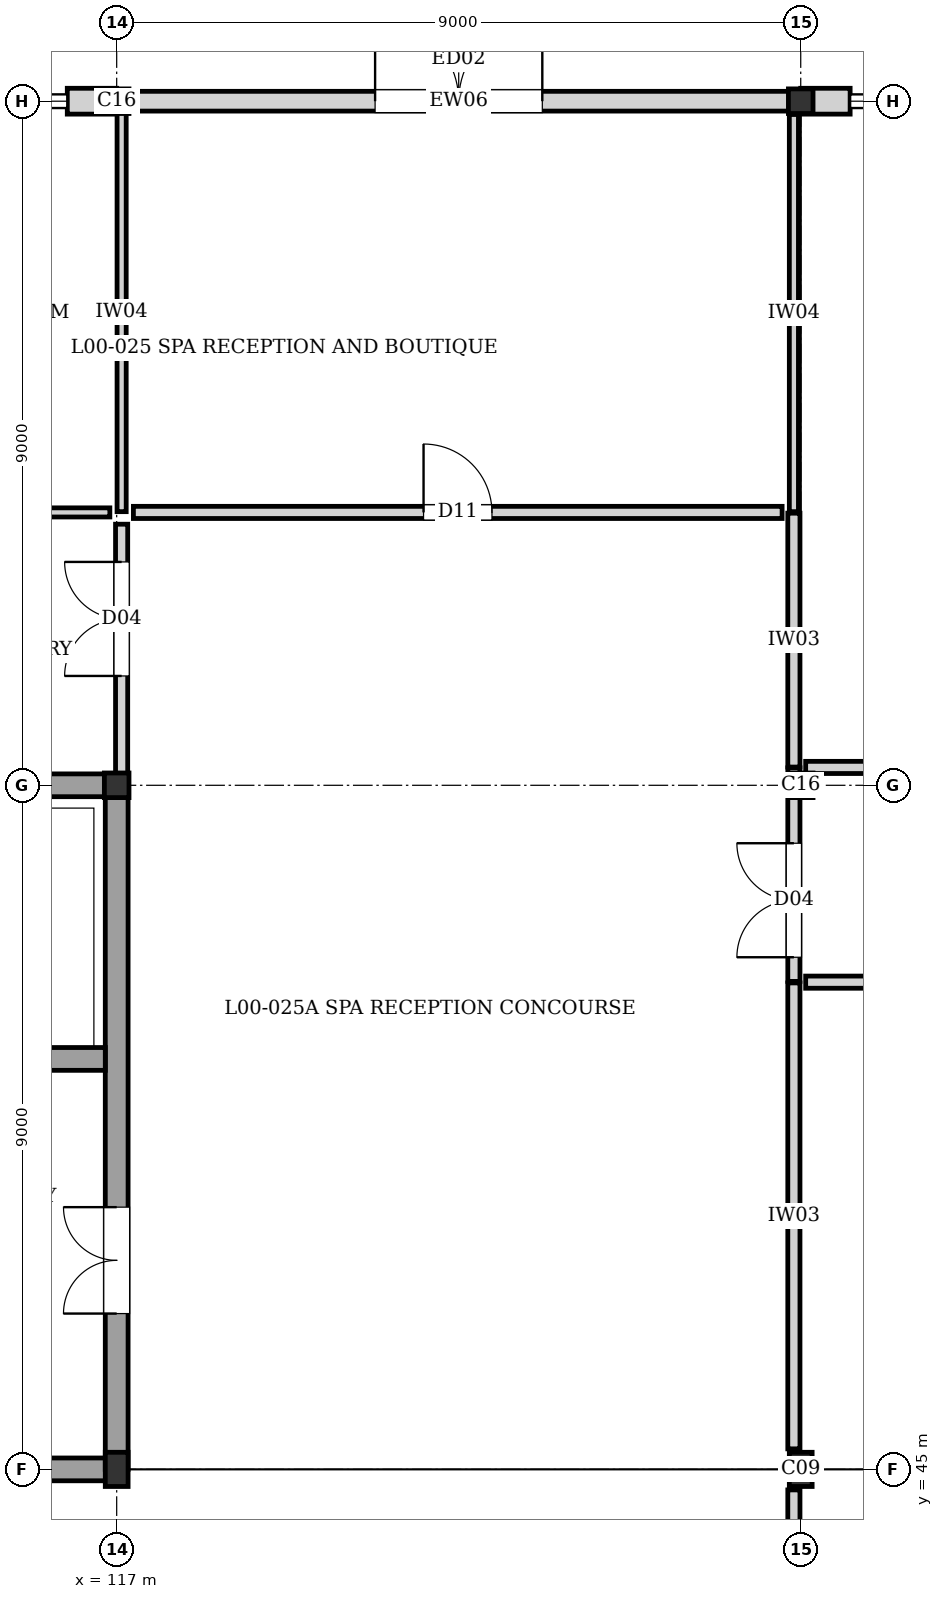
"""IFC4 building model, lengths in metres.
Left out: names, types, materials, properties, quantities, classifications, styles, units other than length and angle.
Written with IfcOpenShell. Run it as: python <this file> out.ifc"""

import sys

from ifc_helpers import new_model, si_unit, direction, frame, frame_2d, origin, origin_2d, place, context, subcontext, project, spatial, rectangle, hollow_circle, i_section, extrude, element, fill, save


model = new_model("IFC4")
c1 = context("Model", 3, precision=1e-05, world=origin(), true_north=direction((0.0, 1.0)))
c2 = subcontext(c1, "Body", "Model", "MODEL_VIEW")
j1 = project(units=[si_unit("LENGTHUNIT", "METRE"), si_unit("PLANEANGLEUNIT", "RADIAN")], contexts=[c1])
p1 = place(None, origin())
s1 = spatial("IfcSite", under=j1, at=p1, CompositionType="ELEMENT")
p2 = place(p1, origin())
s2 = spatial("IfcBuilding", under=s1, at=p2, CompositionType="ELEMENT")
p3 = place(p2, origin())
s3 = spatial("IfcBuildingStorey", under=s2, at=p3, CompositionType="ELEMENT", Elevation=0.0)
p4 = place(p3, frame((117.0, 45.0, 0.0), z_axis=(0.0, 0.0, 1.0), x_axis=(1.0, 0.0, 0.0)))
e1 = element("IfcColumn", 1, at=p4, inside=s3, PredefinedType="COLUMN", context=c2, shape_type="SweptSolid", body=[
    extrude(i_section(OverallWidth=0.3, OverallDepth=0.45, WebThickness=0.014, FlangeThickness=0.026, at=origin_2d()), origin(), (0.0, 0.0, 1.0), 4.32),
])
for number, where, z_axis, x_axis in (
    (2, (117.0, 54.0, 0.0), (0.0, 0.0, 1.0), (1.0, 0.0, 0.0)),
    (3, (117.0, 63.0, 0.0), (0.0, 0.0, 1.0), (1.0, 0.0, 0.0)),
):
    element("IfcColumn", number, at=place(p3, frame(where, z_axis=z_axis, x_axis=x_axis)), inside=s3, PredefinedType="COLUMN", context=c2, shape_type="SweptSolid", body=[
        extrude(hollow_circle(Radius=0.162, WallThickness=0.016, at=origin_2d()), origin(), (0.0, 0.0, 1.0), 4.32),
    ])
p5 = place(p3, frame((126.0, 45.0, 0.0), z_axis=(0.0, 0.0, 1.0), x_axis=(1.0, 0.0, 0.0)))
e4 = element("IfcColumn", 4, at=p5, inside=s3, PredefinedType="COLUMN", context=c2, shape_type="SweptSolid", body=[
    extrude(i_section(OverallWidth=0.3, OverallDepth=0.45, WebThickness=0.014, FlangeThickness=0.026, at=origin_2d()), origin(), (0.0, 0.0, 1.0), 4.32),
])
for number, where, z_axis, x_axis in (
    (5, (126.0, 54.0, 0.0), (0.0, 0.0, 1.0), (1.0, 0.0, 0.0)),
    (6, (126.0, 63.0, 0.0), (0.0, 0.0, 1.0), (1.0, 0.0, 0.0)),
):
    element("IfcColumn", number, at=place(p3, frame(where, z_axis=z_axis, x_axis=x_axis)), inside=s3, PredefinedType="COLUMN", context=c2, shape_type="SweptSolid", body=[
        extrude(hollow_circle(Radius=0.162, WallThickness=0.016, at=origin_2d()), origin(), (0.0, 0.0, 1.0), 4.32),
    ])
p6 = place(p3, frame((116.35, 63.0, 0.0), z_axis=(0.0, 0.0, 1.0), x_axis=(1.0, 0.0, 0.0)))
e7 = element("IfcWall", 7, at=p6, inside=s3, PredefinedType="SOLIDWALL", context=c2, shape_type="SweptSolid", body=[
    extrude(rectangle(XDim=0.65, YDim=0.34, at=frame_2d((0.325, 0.0))), origin(), (0.0, 0.0, 1.0), 3.695),
])
p7 = place(p3, frame((117.0, 63.0, 0.0), z_axis=(0.0, 0.0, 1.0), x_axis=(1.0, 0.0, 0.0)))
e8 = element("IfcWall", 8, at=p7, inside=s3, PredefinedType="SOLIDWALL", context=c2, shape_type="SweptSolid", body=[
    extrude(rectangle(XDim=9.0, YDim=0.26, at=frame_2d((4.5, 0.0))), origin(), (0.0, 0.0, 1.0), 3.655),
])
p8 = place(p7, frame((3.4, 0.0, 0.0)))
e9 = element("IfcOpeningElement", 9, at=p8, cuts=e8, PredefinedType="OPENING", context=c2, shape_type="SweptSolid", body=[
    extrude(rectangle(XDim=2.2, YDim=2.5, at=frame_2d((1.1, 1.25))), frame((0.0, 0.14, 0.0), z_axis=(0.0, -1.0, 0.0), x_axis=(1.0, 0.0, 0.0)), (0.0, 0.0, 1.0), 0.28),
])
p9 = place(p3, frame((126.0, 63.0, 0.0), z_axis=(0.0, 0.0, 1.0), x_axis=(1.0, 0.0, 0.0)))
e10 = element("IfcWall", 10, at=p9, inside=s3, PredefinedType="SOLIDWALL", context=c2, shape_type="SweptSolid", body=[
    extrude(rectangle(XDim=0.65, YDim=0.34, at=frame_2d((0.325, 0.0))), origin(), (0.0, 0.0, 1.0), 3.825),
])
p10 = place(p3, frame((117.0, 45.0, 0.0), z_axis=(0.0, 0.0, 1.0), x_axis=(-1.0, 0.0, 0.0)))
e11 = element("IfcWall", 11, at=p10, inside=s3, PredefinedType="SHEAR", context=c2, shape_type="SweptSolid", body=[
    extrude(rectangle(XDim=9.0, YDim=0.3, at=frame_2d((4.5, 0.0))), origin(), (0.0, 0.0, 1.0), 4.055),
])
p11 = place(p10, frame((5.7, 0.0, 0.0)))
e12 = element("IfcOpeningElement", 12, at=p11, cuts=e11, PredefinedType="OPENING", context=c2, shape_type="SweptSolid", body=[
    extrude(rectangle(XDim=1.8, YDim=2.2, at=frame_2d((0.9, 1.1))), frame((0.0, 0.16, 0.0), z_axis=(0.0, -1.0, 0.0), x_axis=(1.0, 0.0, 0.0)), (0.0, 0.0, 1.0), 0.32),
])
p12 = place(p3, frame((117.0, 45.0, 0.0), z_axis=(0.0, 0.0, 1.0), x_axis=(0.0, 1.0, 0.0)))
e13 = element("IfcWall", 13, at=p12, inside=s3, PredefinedType="SHEAR", context=c2, shape_type="SweptSolid", body=[
    extrude(rectangle(XDim=9.0, YDim=0.3, at=frame_2d((4.5, 0.0))), origin(), (0.0, 0.0, 1.0), 4.055),
])
p13 = place(p12, frame((2.05, 0.0, 0.0)))
e14 = element("IfcOpeningElement", 14, at=p13, cuts=e13, PredefinedType="OPENING", context=c2, shape_type="SweptSolid", body=[
    extrude(rectangle(XDim=1.4, YDim=2.02, at=frame_2d((0.7, 1.01))), frame((0.0, 0.16, 0.0), z_axis=(0.0, -1.0, 0.0), x_axis=(1.0, 0.0, 0.0)), (0.0, 0.0, 1.0), 0.32),
])
p14 = place(p3, frame((108.0, 54.0, 0.0), z_axis=(0.0, 0.0, 1.0), x_axis=(1.0, 0.0, 0.0)))
e15 = element("IfcWall", 15, at=p14, inside=s3, PredefinedType="SHEAR", context=c2, shape_type="SweptSolid", body=[
    extrude(rectangle(XDim=9.0, YDim=0.3, at=frame_2d((4.5, 0.0))), origin(), (0.0, 0.0, 1.0), 4.055),
])
p15 = place(p3, frame((112.65, 50.4, 0.0), z_axis=(0.0, 0.0, 1.0), x_axis=(1.0, 0.0, 0.0)))
e16 = element("IfcWall", 16, at=p15, inside=s3, PredefinedType="SHEAR", context=c2, shape_type="SweptSolid", body=[
    extrude(rectangle(XDim=4.2, YDim=0.3, at=frame_2d((2.1, 0.0))), origin(), (0.0, 0.0, 1.0), 4.055),
])
p16 = place(p15, frame((1.5, 0.0, 0.0)))
e17 = element("IfcOpeningElement", 17, at=p16, cuts=e16, PredefinedType="OPENING", context=c2, shape_type="SweptSolid", body=[
    extrude(rectangle(XDim=1.2, YDim=2.2, at=frame_2d((0.6, 1.1))), frame((0.0, 0.16, 0.0), z_axis=(0.0, -1.0, 0.0), x_axis=(1.0, 0.0, 0.0)), (0.0, 0.0, 1.0), 0.32),
])
p17 = place(p3, frame((125.91, 45.27, 0.0), z_axis=(0.0, 0.0, 1.0), x_axis=(0.0, 1.0, 0.0)))
e18 = element("IfcWall", 18, at=p17, inside=s3, PredefinedType="PARTITIONING", context=c2, shape_type="SweptSolid", body=[
    extrude(rectangle(XDim=6.13, YDim=0.16, at=frame_2d((3.065, 0.0))), origin(), (0.0, 0.0, 1.0), 3.765),
])
p18 = place(p3, frame((125.91, 54.24, 0.0), z_axis=(0.0, 0.0, 1.0), x_axis=(0.0, 1.0, 0.0)))
e19 = element("IfcWall", 19, at=p18, inside=s3, PredefinedType="PARTITIONING", context=c2, shape_type="SweptSolid", body=[
    extrude(rectangle(XDim=3.34, YDim=0.16, at=frame_2d((1.67, 0.0))), origin(), (0.0, 0.0, 1.0), 3.725),
])
p19 = place(p3, frame((117.065, 57.6, 0.0), z_axis=(0.0, 0.0, 1.0), x_axis=(0.0, 1.0, 0.0)))
e20 = element("IfcWall", 20, at=p19, inside=s3, PredefinedType="PARTITIONING", context=c2, shape_type="SweptSolid", body=[
    extrude(rectangle(XDim=5.265, YDim=0.12, at=frame_2d((2.632, 0.0))), origin(), (0.0, 0.0, 1.0), 3.765),
])
p20 = place(p3, frame((125.91, 57.6, 0.0), z_axis=(0.0, 0.0, 1.0), x_axis=(0.0, 1.0, 0.0)))
e21 = element("IfcWall", 21, at=p20, inside=s3, PredefinedType="PARTITIONING", context=c2, shape_type="SweptSolid", body=[
    extrude(rectangle(XDim=5.225, YDim=0.12, at=frame_2d((2.612, 0.0))), origin(), (0.0, 0.0, 1.0), 3.725),
])
p21 = place(p3, frame((125.91, 36.145, 0.0), z_axis=(0.0, 0.0, 1.0), x_axis=(0.0, 1.0, 0.0)))
e22 = element("IfcWall", 22, at=p21, inside=s3, PredefinedType="PARTITIONING", context=c2, shape_type="SweptSolid", body=[
    extrude(rectangle(XDim=8.585, YDim=0.16, at=frame_2d((4.292, 0.0))), origin(), (0.0, 0.0, 1.0), 3.365),
])
p22 = place(p3, frame((117.22, 57.59, 0.0), z_axis=(0.0, 0.0, 1.0), x_axis=(1.0, 0.0, 0.0)))
e23 = element("IfcWall", 23, at=p22, inside=s3, PredefinedType="PARTITIONING", context=c2, shape_type="SweptSolid", body=[
    extrude(rectangle(XDim=8.535, YDim=0.16, at=frame_2d((4.268, 0.0))), origin(), (0.0, 0.0, 1.0), 4.055),
])
p23 = place(p22, frame((3.817, 0.0, 0.0)))
e24 = element("IfcOpeningElement", 24, at=p23, cuts=e23, PredefinedType="OPENING", context=c2, shape_type="SweptSolid", body=[
    extrude(rectangle(XDim=0.9, YDim=2.2, at=frame_2d((0.45, 1.1))), frame((0.0, 0.09, 0.0), z_axis=(0.0, -1.0, 0.0), x_axis=(1.0, 0.0, 0.0)), (0.0, 0.0, 1.0), 0.18),
])
p24 = place(p3, frame((117.065, 54.155, 0.0), z_axis=(0.0, 0.0, 1.0), x_axis=(0.0, 1.0, 0.0)))
e25 = element("IfcWall", 25, at=p24, inside=s3, PredefinedType="PARTITIONING", context=c2, shape_type="SweptSolid", body=[
    extrude(rectangle(XDim=3.28, YDim=0.16, at=frame_2d((1.64, 0.0))), origin(), (0.0, 0.0, 1.0), 3.765),
])
p25 = place(p24, frame((1.284, 0.0, 0.0)))
e26 = element("IfcOpeningElement", 26, at=p25, cuts=e25, PredefinedType="OPENING", context=c2, shape_type="SweptSolid", body=[
    extrude(rectangle(XDim=1.5, YDim=2.1, at=frame_2d((0.75, 1.05))), frame((0.0, 0.09, 0.0), z_axis=(0.0, -1.0, 0.0), x_axis=(1.0, 0.0, 0.0)), (0.0, 0.0, 1.0), 0.18),
])
p26 = place(p3, frame((125.91, 51.42, 0.0), z_axis=(0.0, 0.0, 1.0), x_axis=(0.0, 1.0, 0.0)))
e27 = element("IfcWall", 27, at=p26, inside=s3, PredefinedType="PARTITIONING", context=c2, shape_type="SweptSolid", body=[
    extrude(rectangle(XDim=2.81, YDim=0.16, at=frame_2d((1.405, 0.0))), origin(), (0.0, 0.0, 1.0), 3.765),
])
p27 = place(p26, frame((0.318, 0.0, 0.0)))
e28 = element("IfcOpeningElement", 28, at=p27, cuts=e27, PredefinedType="OPENING", context=c2, shape_type="SweptSolid", body=[
    extrude(rectangle(XDim=1.5, YDim=2.1, at=frame_2d((0.75, 1.05))), frame((0.0, 0.09, 0.0), z_axis=(0.0, -1.0, 0.0), x_axis=(1.0, 0.0, 0.0)), (0.0, 0.0, 1.0), 0.18),
])
p28 = place(p3, frame((108.065, 57.59, 0.0), z_axis=(0.0, 0.0, 1.0), x_axis=(1.0, 0.0, 0.0)))
e29 = element("IfcWall", 29, at=p28, inside=s3, PredefinedType="PARTITIONING", context=c2, shape_type="SweptSolid", body=[
    extrude(rectangle(XDim=8.845, YDim=0.12, at=frame_2d((4.422, 0.0))), origin(), (0.0, 0.0, 1.0), 4.055),
])
p29 = place(p28, frame((3.972, 0.0, 0.0)))
e30 = element("IfcOpeningElement", 30, at=p29, cuts=e29, PredefinedType="OPENING", context=c2, shape_type="SweptSolid", body=[
    extrude(rectangle(XDim=0.9, YDim=2.2, at=frame_2d((0.45, 1.1))), frame((0.0, 0.07, 0.0), z_axis=(0.0, -1.0, 0.0), x_axis=(1.0, 0.0, 0.0)), (0.0, 0.0, 1.0), 0.14),
])
p30 = place(p3, frame((126.065, 51.41, 0.0), z_axis=(0.0, 0.0, 1.0), x_axis=(1.0, 0.0, 0.0)))
e31 = element("IfcWall", 31, at=p30, inside=s3, PredefinedType="PARTITIONING", context=c2, shape_type="SweptSolid", body=[
    extrude(rectangle(XDim=12.69, YDim=0.16, at=frame_2d((6.345, 0.0))), origin(), (0.0, 0.0, 1.0), 4.055),
])
p31 = place(p30, frame((4.372, 0.0, 0.0)))
e32 = element("IfcOpeningElement", 32, at=p31, cuts=e31, PredefinedType="OPENING", context=c2, shape_type="SweptSolid", body=[
    extrude(rectangle(XDim=0.9, YDim=2.2, at=frame_2d((0.45, 1.1))), frame((0.0, 0.09, 0.0), z_axis=(0.0, -1.0, 0.0), x_axis=(1.0, 0.0, 0.0)), (0.0, 0.0, 1.0), 0.18),
])
p32 = place(p3, frame((126.065, 54.235, 0.0), z_axis=(0.0, 0.0, 1.0), x_axis=(1.0, 0.0, 0.0)))
e33 = element("IfcWall", 33, at=p32, inside=s3, PredefinedType="PARTITIONING", context=c2, shape_type="SweptSolid", body=[
    extrude(rectangle(XDim=12.835, YDim=0.16, at=frame_2d((6.417, 0.0))), origin(), (0.0, 0.0, 1.0), 4.055),
])
p33 = place(p32, frame((4.427, 0.0, 0.0)))
e34 = element("IfcOpeningElement", 34, at=p33, cuts=e33, PredefinedType="OPENING", context=c2, shape_type="SweptSolid", body=[
    extrude(rectangle(XDim=0.9, YDim=2.2, at=frame_2d((0.45, 1.1))), frame((0.0, 0.09, 0.0), z_axis=(0.0, -1.0, 0.0), x_axis=(1.0, 0.0, 0.0)), (0.0, 0.0, 1.0), 0.18),
])
p34 = place(p8, origin())
e35 = element("IfcDoor", 35, at=p34, inside=s3, OperationType="DOUBLE_DOOR_SINGLE_SWING", PredefinedType="DOOR", context=c2, shape_type="SweptSolid", body=[
    extrude(rectangle(XDim=2.2, YDim=2.5, at=frame_2d((1.1, 1.25))), frame((0.0, 0.025, 0.0), z_axis=(0.0, -1.0, 0.0), x_axis=(1.0, 0.0, 0.0)), (0.0, 0.0, 1.0), 0.05),
])
fill(e9, e35)
p35 = place(p13, origin())
e36 = element("IfcDoor", 36, at=p35, inside=s3, OperationType="DOUBLE_DOOR_SINGLE_SWING", PredefinedType="DOOR", context=c2, shape_type="SweptSolid", body=[
    extrude(rectangle(XDim=1.4, YDim=2.02, at=frame_2d((0.7, 1.01))), frame((0.0, 0.025, 0.0), z_axis=(0.0, -1.0, 0.0), x_axis=(1.0, 0.0, 0.0)), (0.0, 0.0, 1.0), 0.05),
])
fill(e14, e36)
p36 = place(p23, origin())
e37 = element("IfcDoor", 37, at=p36, inside=s3, OperationType="SINGLE_SWING_LEFT", PredefinedType="DOOR", context=c2, shape_type="SweptSolid", body=[
    extrude(rectangle(XDim=0.9, YDim=2.2, at=frame_2d((0.45, 1.1))), frame((0.0, 0.025, 0.0), z_axis=(0.0, -1.0, 0.0), x_axis=(1.0, 0.0, 0.0)), (0.0, 0.0, 1.0), 0.05),
])
fill(e24, e37)
p37 = place(p25, origin())
e38 = element("IfcDoor", 38, at=p37, inside=s3, OperationType="DOUBLE_DOOR_SINGLE_SWING", PredefinedType="DOOR", context=c2, shape_type="SweptSolid", body=[
    extrude(rectangle(XDim=1.5, YDim=2.1, at=frame_2d((0.75, 1.05))), frame((0.0, 0.025, 0.0), z_axis=(0.0, -1.0, 0.0), x_axis=(1.0, 0.0, 0.0)), (0.0, 0.0, 1.0), 0.05),
])
fill(e26, e38)
p38 = place(p27, origin())
e39 = element("IfcDoor", 39, at=p38, inside=s3, OperationType="DOUBLE_DOOR_SINGLE_SWING", PredefinedType="DOOR", context=c2, shape_type="SweptSolid", body=[
    extrude(rectangle(XDim=1.5, YDim=2.1, at=frame_2d((0.75, 1.05))), frame((0.0, 0.025, 0.0), z_axis=(0.0, -1.0, 0.0), x_axis=(1.0, 0.0, 0.0)), (0.0, 0.0, 1.0), 0.05),
])
fill(e28, e39)
save(model, sys.argv[1])
